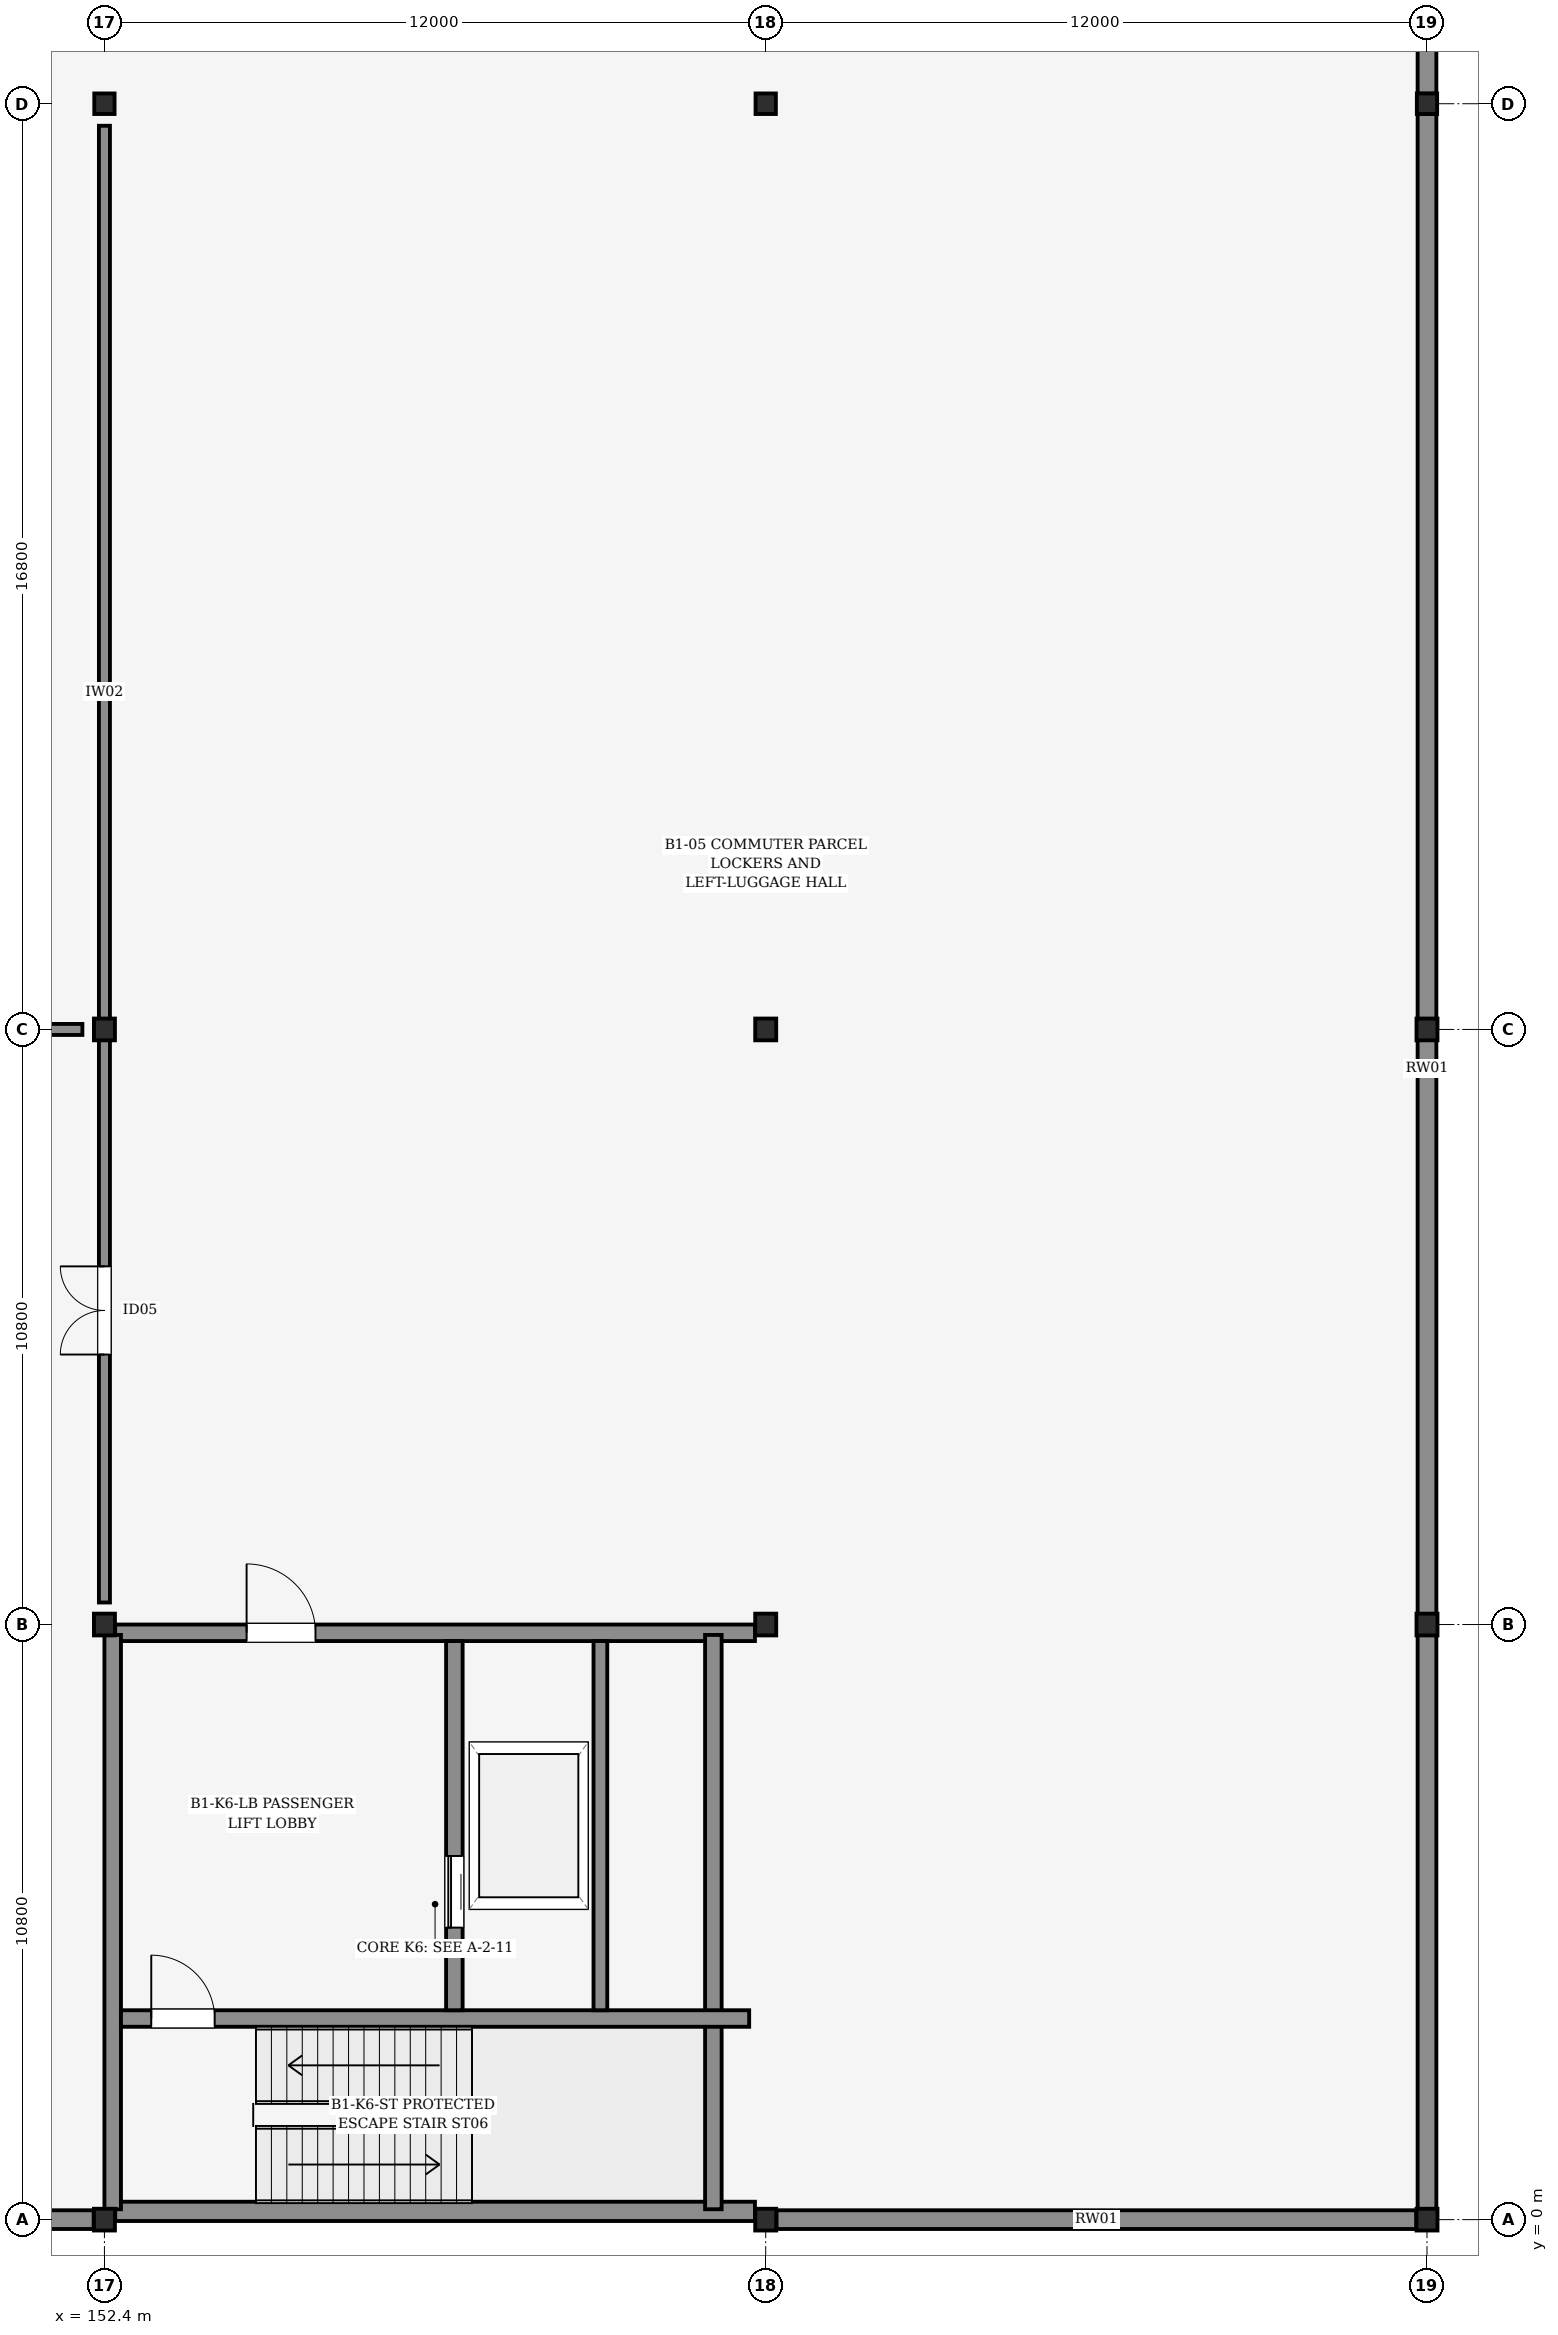
"""IFC4 building model, lengths in metres.
Left out: names, types, materials, properties, quantities, classifications, styles, units other than length and angle.
Written with IfcOpenShell. Run it as: python <this file> out.ifc"""

import sys

from ifc_helpers import new_model, si_unit, direction, frame, frame_2d, origin, origin_2d, place, context, subcontext, project, spatial, rectangle, i_section, extrude, element, fill, save


model = new_model("IFC4")
c1 = context("Model", 3, precision=1e-05, world=origin(), true_north=direction((0.0, 1.0)))
c2 = subcontext(c1, "Body", "Model", "MODEL_VIEW")
j1 = project(units=[si_unit("LENGTHUNIT", "METRE"), si_unit("PLANEANGLEUNIT", "RADIAN")], contexts=[c1])
p1 = place(None, origin())
s1 = spatial("IfcSite", under=j1, at=p1, CompositionType="ELEMENT")
p2 = place(p1, origin())
s2 = spatial("IfcBuilding", under=s1, at=p2, CompositionType="ELEMENT")
p3 = place(p2, frame((0.0, 0.0, -5.4)))
s3 = spatial("IfcBuildingStorey", under=s2, at=p3, CompositionType="ELEMENT", Elevation=-5.4)
for number, where, z_axis, x_axis in (
    (1, (152.4, 0.0, 0.0), (0.0, 0.0, 1.0), (1.0, 0.0, 0.0)),
    (2, (152.4, 10.8, 0.0), (0.0, 0.0, 1.0), (1.0, 0.0, 0.0)),
    (3, (152.4, 21.6, 0.0), (0.0, 0.0, 1.0), (1.0, 0.0, 0.0)),
):
    element("IfcColumn", number, at=place(p3, frame(where, z_axis=z_axis, x_axis=x_axis)), inside=s3, PredefinedType="COLUMN", context=c2, shape_type="SweptSolid", body=[
        extrude(i_section(OverallWidth=0.395, OverallDepth=0.381, WebThickness=0.018, FlangeThickness=0.03, FilletRadius=0.015, at=origin_2d()), origin(), (0.0, 0.0, 1.0), 5.4),
    ])
p4 = place(p3, frame((152.4, 38.4, 0.0), z_axis=(0.0, 0.0, 1.0), x_axis=(1.0, 0.0, 0.0)))
e4 = element("IfcColumn", 4, at=p4, inside=s3, PredefinedType="COLUMN", context=c2, shape_type="SweptSolid", body=[
    extrude(i_section(OverallWidth=0.373, OverallDepth=0.368, WebThickness=0.014, FlangeThickness=0.024, FilletRadius=0.015, at=origin_2d()), origin(), (0.0, 0.0, 1.0), 5.4),
])
for number, where, z_axis, x_axis in (
    (5, (164.4, 0.0, 0.0), (0.0, 0.0, 1.0), (1.0, 0.0, 0.0)),
    (6, (164.4, 10.8, 0.0), (0.0, 0.0, 1.0), (1.0, 0.0, 0.0)),
    (7, (164.4, 21.6, 0.0), (0.0, 0.0, 1.0), (1.0, 0.0, 0.0)),
):
    element("IfcColumn", number, at=place(p3, frame(where, z_axis=z_axis, x_axis=x_axis)), inside=s3, PredefinedType="COLUMN", context=c2, shape_type="SweptSolid", body=[
        extrude(i_section(OverallWidth=0.395, OverallDepth=0.381, WebThickness=0.018, FlangeThickness=0.03, FilletRadius=0.015, at=origin_2d()), origin(), (0.0, 0.0, 1.0), 5.4),
    ])
p5 = place(p3, frame((164.4, 38.4, 0.0), z_axis=(0.0, 0.0, 1.0), x_axis=(1.0, 0.0, 0.0)))
e8 = element("IfcColumn", 8, at=p5, inside=s3, PredefinedType="COLUMN", context=c2, shape_type="SweptSolid", body=[
    extrude(i_section(OverallWidth=0.373, OverallDepth=0.368, WebThickness=0.014, FlangeThickness=0.024, FilletRadius=0.015, at=origin_2d()), origin(), (0.0, 0.0, 1.0), 5.4),
])
for number, where, z_axis, x_axis in (
    (9, (176.4, 0.0, 0.0), (0.0, 0.0, 1.0), (1.0, 0.0, 0.0)),
    (10, (176.4, 10.8, 0.0), (0.0, 0.0, 1.0), (1.0, 0.0, 0.0)),
    (11, (176.4, 21.6, 0.0), (0.0, 0.0, 1.0), (1.0, 0.0, 0.0)),
):
    element("IfcColumn", number, at=place(p3, frame(where, z_axis=z_axis, x_axis=x_axis)), inside=s3, PredefinedType="COLUMN", context=c2, shape_type="SweptSolid", body=[
        extrude(i_section(OverallWidth=0.395, OverallDepth=0.381, WebThickness=0.018, FlangeThickness=0.03, FilletRadius=0.015, at=origin_2d()), origin(), (0.0, 0.0, 1.0), 5.4),
    ])
p6 = place(p3, frame((176.4, 38.4, 0.0), z_axis=(0.0, 0.0, 1.0), x_axis=(1.0, 0.0, 0.0)))
e12 = element("IfcColumn", 12, at=p6, inside=s3, PredefinedType="COLUMN", context=c2, shape_type="SweptSolid", body=[
    extrude(i_section(OverallWidth=0.373, OverallDepth=0.368, WebThickness=0.014, FlangeThickness=0.024, FilletRadius=0.015, at=origin_2d()), origin(), (0.0, 0.0, 1.0), 5.4),
])
for number, where, z_axis, x_axis in (
    (13, (140.595, 0.0, 0.0), (0.0, 0.0, 1.0), (1.0, 0.0, 0.0)),
    (14, (164.595, 0.0, 0.0), (0.0, 0.0, 1.0), (1.0, 0.0, 0.0)),
):
    element("IfcWall", number, at=place(p3, frame(where, z_axis=z_axis, x_axis=x_axis)), inside=s3, PredefinedType="USERDEFINED", context=c2, shape_type="SweptSolid", body=[
        extrude(rectangle(XDim=11.609, YDim=0.34, at=frame_2d((5.805, 0.0))), origin(), (0.0, 0.0, 1.0), 4.06),
    ])
for number, where, z_axis, x_axis in (
    (15, (176.4, 0.188, 0.0), (0.0, 0.0, 1.0), (0.0, 1.0, 0.0)),
    (16, (176.4, 10.989, 0.0), (0.0, 0.0, 1.0), (0.0, 1.0, 0.0)),
):
    element("IfcWall", number, at=place(p3, frame(where, z_axis=z_axis, x_axis=x_axis)), inside=s3, PredefinedType="USERDEFINED", context=c2, shape_type="SweptSolid", body=[
        extrude(rectangle(XDim=10.423, YDim=0.34, at=frame_2d((5.211, 0.0))), origin(), (0.0, 0.0, 1.0), 4.06),
    ])
p7 = place(p3, frame((176.4, 21.789, 0.0), z_axis=(0.0, 0.0, 1.0), x_axis=(0.0, 1.0, 0.0)))
e17 = element("IfcWall", 17, at=p7, inside=s3, PredefinedType="USERDEFINED", context=c2, shape_type="SweptSolid", body=[
    extrude(rectangle(XDim=16.429, YDim=0.34, at=frame_2d((8.215, 0.0))), origin(), (0.0, 0.0, 1.0), 4.06),
])
p8 = place(p3, frame((176.4, 38.582, 0.0), z_axis=(0.0, 0.0, 1.0), x_axis=(0.0, 1.0, 0.0)))
e18 = element("IfcWall", 18, at=p8, inside=s3, PredefinedType="USERDEFINED", context=c2, shape_type="SweptSolid", body=[
    extrude(rectangle(XDim=8.036, YDim=0.34, at=frame_2d((4.018, 0.0))), origin(), (0.0, 0.0, 1.0), 4.06),
])
p9 = place(p3, frame((152.595, 0.15, 0.0), z_axis=(0.0, 0.0, 1.0), x_axis=(1.0, 0.0, 0.0)))
e19 = element("IfcWall", 19, at=p9, inside=s3, PredefinedType="SHEAR", context=c2, shape_type="SweptSolid", body=[
    extrude(rectangle(XDim=11.609, YDim=0.35, at=frame_2d((5.805, 0.0))), origin(), (0.0, 0.0, 1.0), 5.12),
])
p10 = place(p3, frame((152.595, 10.65, 0.0), z_axis=(0.0, 0.0, 1.0), x_axis=(1.0, 0.0, 0.0)))
e20 = element("IfcWall", 20, at=p10, inside=s3, PredefinedType="SHEAR", context=c2, shape_type="SweptSolid", body=[
    extrude(rectangle(XDim=11.609, YDim=0.3, at=frame_2d((5.805, 0.0))), origin(), (0.0, 0.0, 1.0), 5.12),
])
p11 = place(p10, frame((2.385, 0.0, 0.0)))
e21 = element("IfcOpeningElement", 21, at=p11, cuts=e20, PredefinedType="OPENING", context=c2, shape_type="SweptSolid", body=[
    extrude(rectangle(XDim=1.25, YDim=2.15, at=frame_2d((0.625, 1.075))), frame((0.0, 0.16, 0.0), z_axis=(0.0, -1.0, 0.0), x_axis=(1.0, 0.0, 0.0)), (0.0, 0.0, 1.0), 0.32),
])
for number, where, z_axis, x_axis in (
    (22, (152.55, 0.188, 0.0), (0.0, 0.0, 1.0), (0.0, 1.0, 0.0)),
    (23, (163.45, 0.188, 0.0), (0.0, 0.0, 1.0), (0.0, 1.0, 0.0)),
):
    element("IfcWall", number, at=place(p3, frame(where, z_axis=z_axis, x_axis=x_axis)), inside=s3, PredefinedType="SHEAR", context=c2, shape_type="SweptSolid", body=[
        extrude(rectangle(XDim=10.423, YDim=0.3, at=frame_2d((5.211, 0.0))), origin(), (0.0, 0.0, 1.0), 5.12),
    ])
p12 = place(p3, frame((152.7, 3.65, 0.0), z_axis=(0.0, 0.0, 1.0), x_axis=(1.0, 0.0, 0.0)))
e24 = element("IfcWall", 24, at=p12, inside=s3, PredefinedType="SHEAR", context=c2, shape_type="SweptSolid", body=[
    extrude(rectangle(XDim=11.4, YDim=0.3, at=frame_2d((5.7, 0.0))), origin(), (0.0, 0.0, 1.0), 5.12),
])
p13 = place(p12, frame((0.55, 0.0, 0.0)))
e25 = element("IfcOpeningElement", 25, at=p13, cuts=e24, PredefinedType="OPENING", context=c2, shape_type="SweptSolid", body=[
    extrude(rectangle(XDim=1.15, YDim=2.15, at=frame_2d((0.575, 1.075))), frame((0.0, 0.16, 0.0), z_axis=(0.0, -1.0, 0.0), x_axis=(1.0, 0.0, 0.0)), (0.0, 0.0, 1.0), 0.32),
])
p14 = place(p3, frame((158.75, 3.8, 0.0), z_axis=(0.0, 0.0, 1.0), x_axis=(0.0, 1.0, 0.0)))
e26 = element("IfcWall", 26, at=p14, inside=s3, PredefinedType="SHEAR", context=c2, shape_type="SweptSolid", body=[
    extrude(rectangle(XDim=6.7, YDim=0.3, at=frame_2d((3.35, 0.0))), origin(), (0.0, 0.0, 1.0), 5.12),
])
p15 = place(p14, frame((1.5, 0.0, 0.0)))
e27 = element("IfcOpeningElement", 27, at=p15, cuts=e26, PredefinedType="OPENING", context=c2, shape_type="SweptSolid", body=[
    extrude(rectangle(XDim=1.3, YDim=2.3, at=frame_2d((0.65, 1.15))), frame((0.0, 0.16, 0.0), z_axis=(0.0, -1.0, 0.0), x_axis=(1.0, 0.0, 0.0)), (0.0, 0.0, 1.0), 0.32),
])
p16 = place(p3, frame((161.4, 3.8, 0.0), z_axis=(0.0, 0.0, 1.0), x_axis=(0.0, 1.0, 0.0)))
e28 = element("IfcWall", 28, at=p16, inside=s3, PredefinedType="PARTITIONING", context=c2, shape_type="SweptSolid", body=[
    extrude(rectangle(XDim=6.7, YDim=0.25, at=frame_2d((3.35, 0.0))), origin(), (0.0, 0.0, 1.0), 4.025),
])
p17 = place(p3, frame((116.8, 21.6, 0.0), z_axis=(0.0, 0.0, 1.0), x_axis=(1.0, 0.0, 0.0)))
e29 = element("IfcWall", 29, at=p17, inside=s3, PredefinedType="PARTITIONING", context=c2, shape_type="SweptSolid", body=[
    extrude(rectangle(XDim=35.2, YDim=0.2, at=frame_2d((17.6, 0.0))), origin(), (0.0, 0.0, 1.0), 4.025),
])
p18 = place(p17, frame((5.0, 0.0, 0.0)))
e30 = element("IfcOpeningElement", 30, at=p18, cuts=e29, PredefinedType="OPENING", context=c2, shape_type="SweptSolid", body=[
    extrude(rectangle(XDim=1.4, YDim=2.2, at=frame_2d((0.7, 1.1))), frame((0.0, 0.11, 0.0), z_axis=(0.0, -1.0, 0.0), x_axis=(1.0, 0.0, 0.0)), (0.0, 0.0, 1.0), 0.22),
])
p19 = place(p3, frame((152.4, 11.2, 0.0), z_axis=(0.0, 0.0, 1.0), x_axis=(0.0, 1.0, 0.0)))
e31 = element("IfcWall", 31, at=p19, inside=s3, PredefinedType="PARTITIONING", context=c2, shape_type="SweptSolid", body=[
    extrude(rectangle(XDim=26.8, YDim=0.2, at=frame_2d((13.4, 0.0))), origin(), (0.0, 0.0, 1.0), 4.025),
])
p20 = place(p19, frame((4.5, 0.0, 0.0)))
e32 = element("IfcOpeningElement", 32, at=p20, cuts=e31, PredefinedType="OPENING", context=c2, shape_type="SweptSolid", body=[
    extrude(rectangle(XDim=1.6, YDim=2.25, at=frame_2d((0.8, 1.125))), frame((0.0, 0.11, 0.0), z_axis=(0.0, -1.0, 0.0), x_axis=(1.0, 0.0, 0.0)), (0.0, 0.0, 1.0), 0.22),
])
p21 = place(p11, origin())
e33 = element("IfcDoor", 33, at=p21, inside=s3, OperationType="SINGLE_SWING_LEFT", PredefinedType="DOOR", context=c2, shape_type="SweptSolid", body=[
    extrude(rectangle(XDim=1.25, YDim=2.15, at=frame_2d((0.625, 1.075))), frame((0.0, 0.025, 0.0), z_axis=(0.0, -1.0, 0.0), x_axis=(1.0, 0.0, 0.0)), (0.0, 0.0, 1.0), 0.05),
])
fill(e21, e33)
p22 = place(p13, origin())
e34 = element("IfcDoor", 34, at=p22, inside=s3, OperationType="SINGLE_SWING_LEFT", PredefinedType="DOOR", context=c2, shape_type="SweptSolid", body=[
    extrude(rectangle(XDim=1.15, YDim=2.15, at=frame_2d((0.575, 1.075))), frame((0.0, 0.025, 0.0), z_axis=(0.0, -1.0, 0.0), x_axis=(1.0, 0.0, 0.0)), (0.0, 0.0, 1.0), 0.05),
])
fill(e25, e34)
p23 = place(p15, origin())
e35 = element("IfcDoor", 35, at=p23, inside=s3, OperationType="SLIDING_TO_LEFT", PredefinedType="DOOR", context=c2, shape_type="SweptSolid", body=[
    extrude(rectangle(XDim=1.3, YDim=2.3, at=frame_2d((0.65, 1.15))), frame((0.0, 0.025, 0.0), z_axis=(0.0, -1.0, 0.0), x_axis=(1.0, 0.0, 0.0)), (0.0, 0.0, 1.0), 0.05),
])
fill(e27, e35)
p24 = place(p20, origin())
e36 = element("IfcDoor", 36, at=p24, inside=s3, OperationType="DOUBLE_DOOR_SINGLE_SWING", PredefinedType="DOOR", context=c2, shape_type="SweptSolid", body=[
    extrude(rectangle(XDim=1.6, YDim=2.25, at=frame_2d((0.8, 1.125))), frame((0.0, 0.025, 0.0), z_axis=(0.0, -1.0, 0.0), x_axis=(1.0, 0.0, 0.0)), (0.0, 0.0, 1.0), 0.05),
])
fill(e32, e36)
save(model, sys.argv[1])
